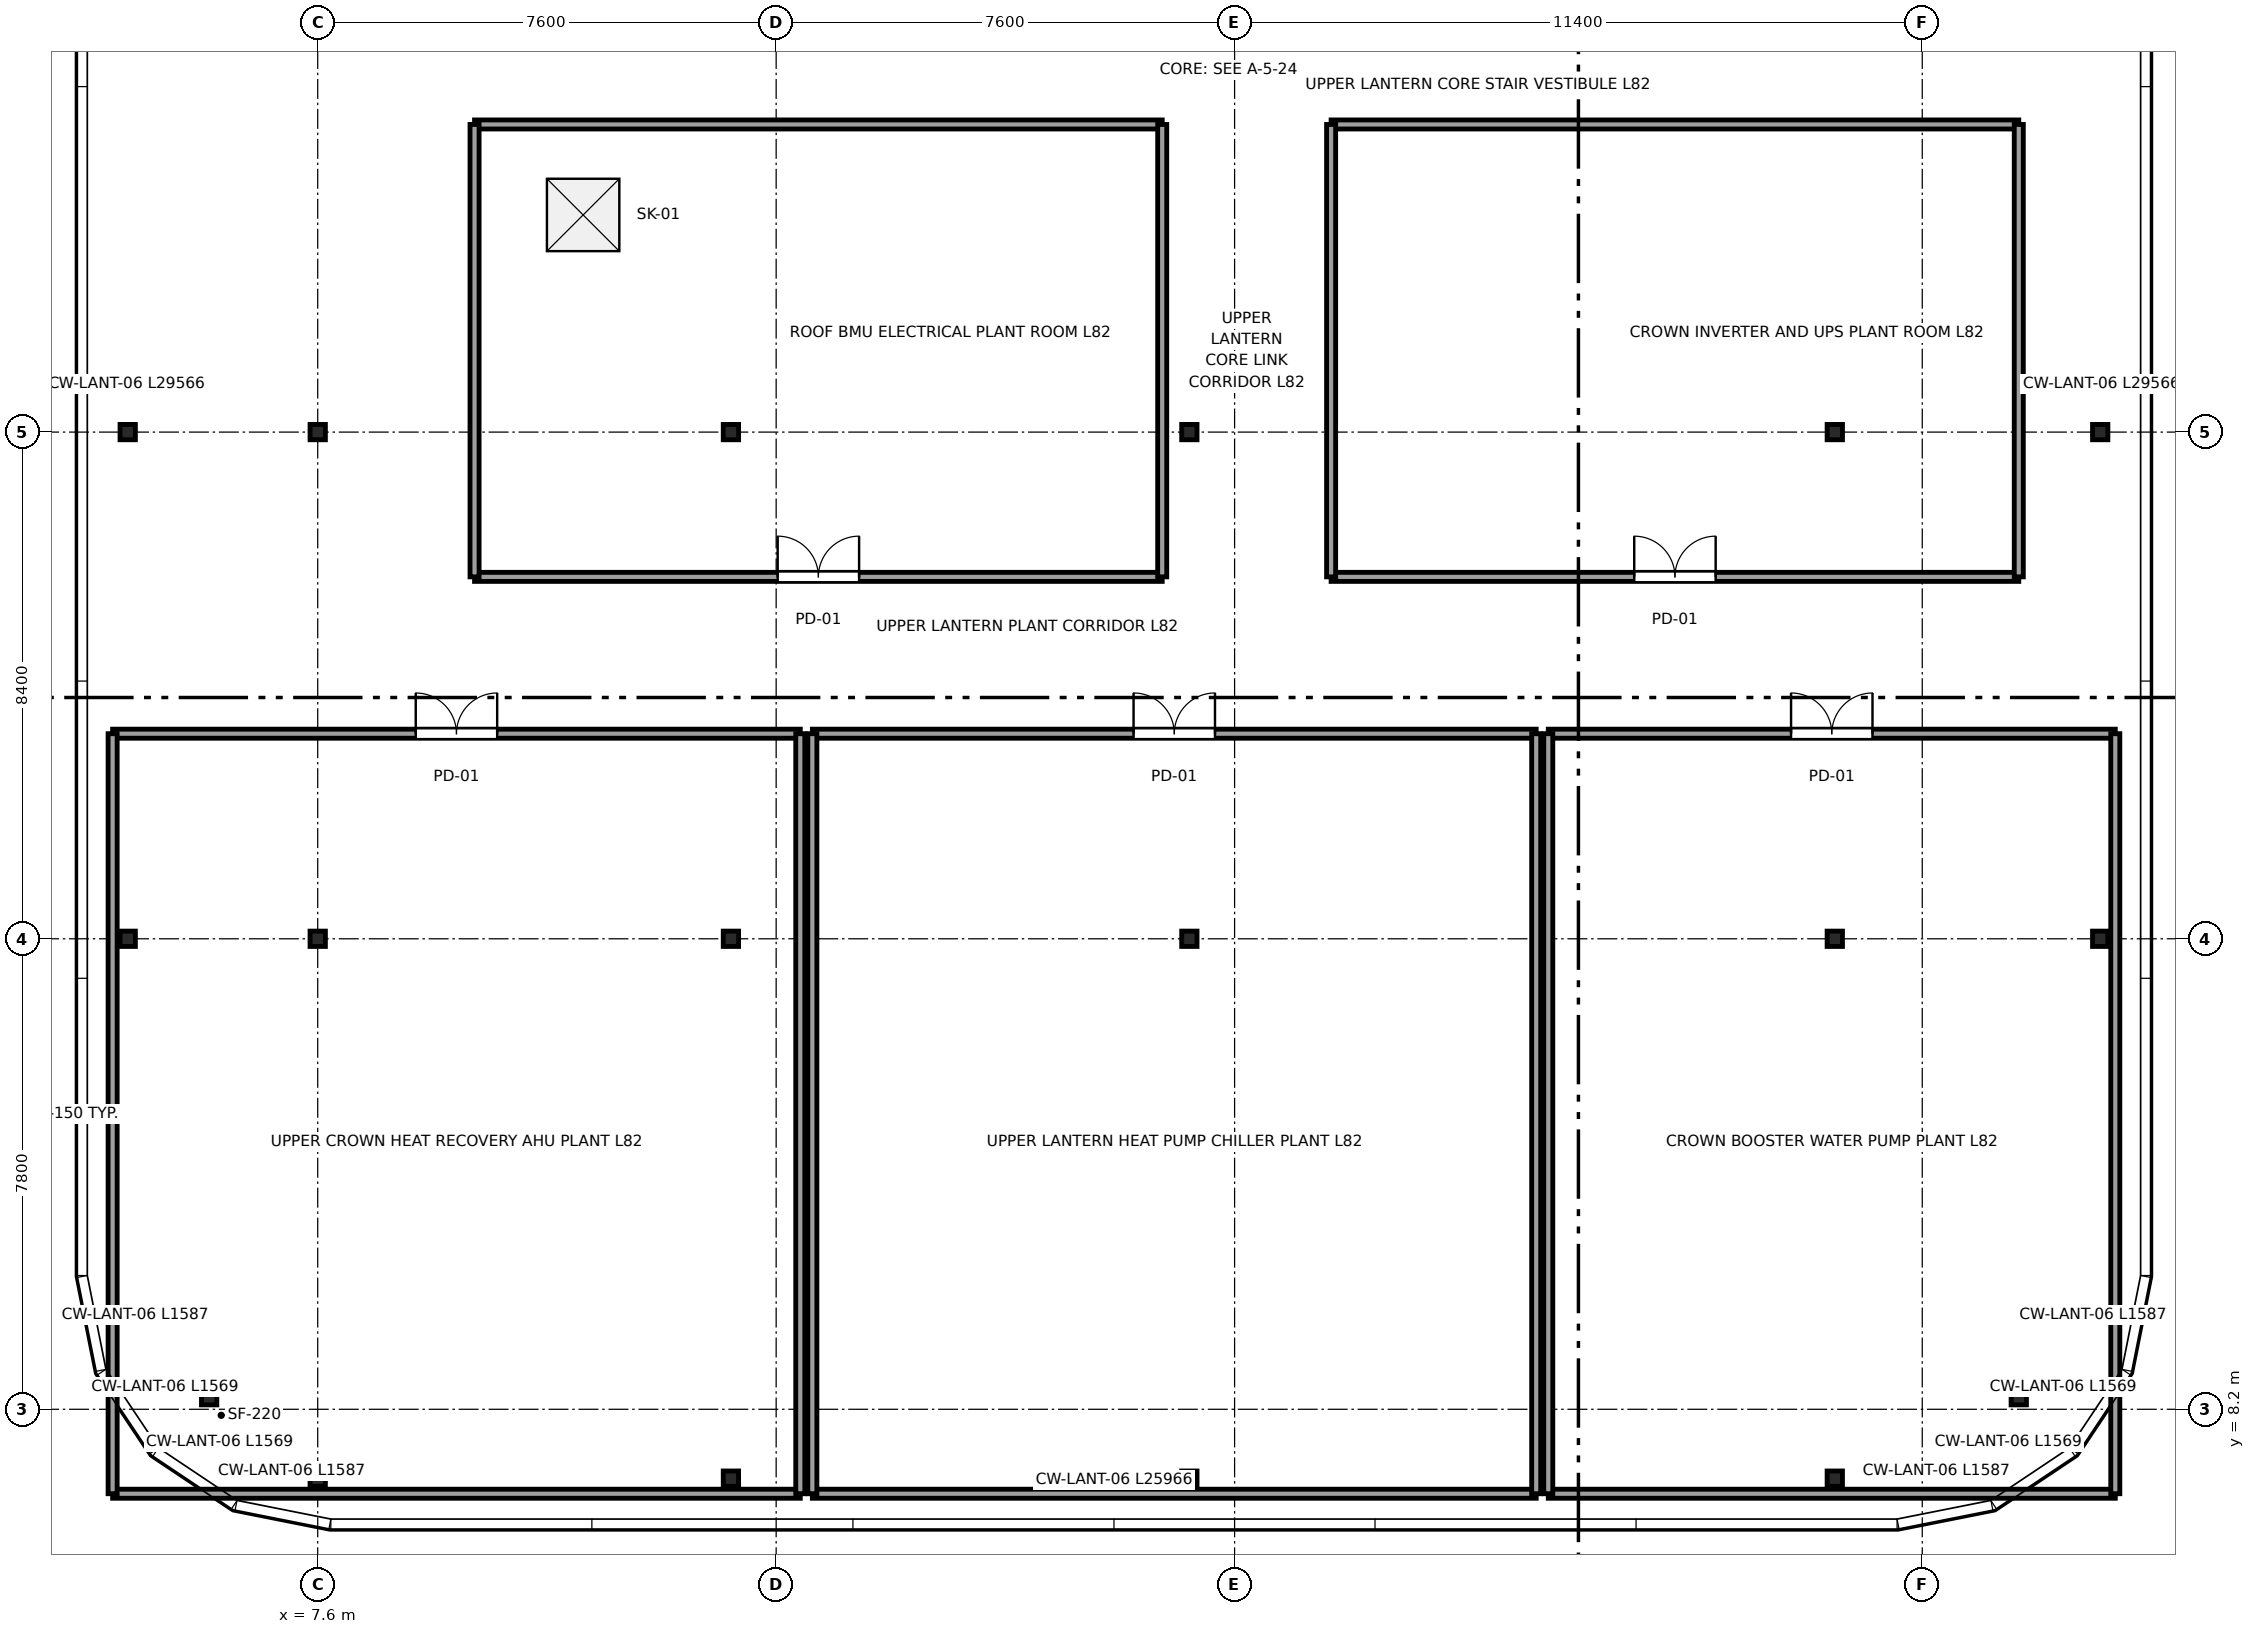
"""IFC4 building model, lengths in metres.
Left out: names, types, materials, properties, quantities, classifications, styles, units other than length and angle.
Written with IfcOpenShell. Run it as: python <this file> out.ifc"""

import sys

from ifc_helpers import new_model, si_unit, direction, frame, frame_2d, origin, origin_2d, place, context, subcontext, project, spatial, rectangle, i_section, extrude, source, transform, mapped, element, fill, save


model = new_model("IFC4")
c1 = context("Model", 3, precision=1e-05, world=origin(), true_north=direction((0.0, 1.0)))
c2 = subcontext(c1, "Body", "Model", "MODEL_VIEW")
j1 = project(units=[si_unit("LENGTHUNIT", "METRE"), si_unit("PLANEANGLEUNIT", "RADIAN")], contexts=[c1])
p1 = place(None, origin())
s1 = spatial("IfcSite", under=j1, at=p1, CompositionType="ELEMENT")
p2 = place(p1, origin())
s2 = spatial("IfcBuilding", under=s1, at=p2, CompositionType="ELEMENT")
p3 = place(p2, frame((0.0, 0.0, 309.95)))
s3 = spatial("IfcBuildingStorey", under=s2, at=p3, CompositionType="ELEMENT", Elevation=309.95)
m1 = source(origin(), c2, "Body", "SweptSolid", [
    extrude(i_section(OverallWidth=0.254, OverallDepth=0.254, WebThickness=0.009, FlangeThickness=0.014, FilletRadius=0.014, at=origin_2d()), origin(), (0.0, 0.0, 1.0), 3.8),
])
for number, where, z_axis, x_axis in (
    (1, (5.8, 8.4, 0.0), (0.0, 0.0, 1.0), (1.0, 0.0, 0.0)),
    (2, (4.45, 16.0, 0.0), (0.0, 0.0, 1.0), (1.0, 0.0, 0.0)),
    (3, (4.45, 24.4, 0.0), (0.0, 0.0, 1.0), (1.0, 0.0, 0.0)),
    (4, (7.6, 7.05, 0.0), (0.0, 0.0, 1.0), (1.0, 0.0, 0.0)),
    (5, (7.6, 16.0, 0.0), (0.0, 0.0, 1.0), (1.0, 0.0, 0.0)),
    (6, (7.6, 24.4, 0.0), (0.0, 0.0, 1.0), (1.0, 0.0, 0.0)),
    (7, (14.45, 7.05, 0.0), (0.0, 0.0, 1.0), (1.0, 0.0, 0.0)),
    (8, (14.45, 16.0, 0.0), (0.0, 0.0, 1.0), (1.0, 0.0, 0.0)),
    (9, (14.45, 24.4, 0.0), (0.0, 0.0, 1.0), (1.0, 0.0, 0.0)),
    (10, (22.05, 7.05, 0.0), (0.0, 0.0, 1.0), (1.0, 0.0, 0.0)),
    (11, (22.05, 16.0, 0.0), (0.0, 0.0, 1.0), (1.0, 0.0, 0.0)),
    (12, (22.05, 24.4, 0.0), (0.0, 0.0, 1.0), (1.0, 0.0, 0.0)),
    (13, (32.75, 7.05, 0.0), (0.0, 0.0, 1.0), (1.0, 0.0, 0.0)),
    (14, (32.75, 16.0, 0.0), (0.0, 0.0, 1.0), (1.0, 0.0, 0.0)),
    (15, (32.75, 24.4, 0.0), (0.0, 0.0, 1.0), (1.0, 0.0, 0.0)),
    (16, (35.8, 8.4, 0.0), (0.0, 0.0, 1.0), (1.0, 0.0, 0.0)),
    (17, (37.15, 16.0, 0.0), (0.0, 0.0, 1.0), (1.0, 0.0, 0.0)),
    (18, (37.15, 24.4, 0.0), (0.0, 0.0, 1.0), (1.0, 0.0, 0.0)),
):
    element("IfcColumn", number, at=place(p3, frame(where, z_axis=z_axis, x_axis=x_axis)), inside=s3, PredefinedType="COLUMN", context=c2, shape_type="MappedRepresentation", body=[
        mapped(m1, transform((0.0, 0.0, 0.0), x_axis=(1.0, 0.0, 0.0), y_axis=(0.0, 1.0, 0.0), z_axis=(0.0, 0.0, 1.0), scale=1.0)),
    ])
p4 = place(p3, frame((4.2, 6.8, 0.0), z_axis=(0.0, 0.0, 1.0), x_axis=(1.0, 0.0, 0.0)))
e19 = element("IfcWall", 19, at=p4, inside=s3, PredefinedType="PARTITIONING", context=c2, shape_type="SweptSolid", body=[
    extrude(rectangle(XDim=11.4, YDim=0.15, at=frame_2d((5.7, 0.0))), origin(), (0.0, 0.0, 1.0), 3.4),
])
p5 = place(p3, frame((4.2, 19.4, 0.0), z_axis=(0.0, 0.0, 1.0), x_axis=(1.0, 0.0, 0.0)))
e20 = element("IfcWall", 20, at=p5, inside=s3, PredefinedType="PARTITIONING", context=c2, shape_type="SweptSolid", body=[
    extrude(rectangle(XDim=11.4, YDim=0.15, at=frame_2d((5.7, 0.0))), origin(), (0.0, 0.0, 1.0), 3.4),
])
p6 = place(p5, frame((5.025, 0.0, 0.0)))
e21 = element("IfcOpeningElement", 21, at=p6, cuts=e20, PredefinedType="OPENING", context=c2, shape_type="SweptSolid", body=[
    extrude(rectangle(XDim=1.35, YDim=2.15, at=frame_2d((0.675, 1.075))), frame((0.0, 0.085, 0.0), z_axis=(0.0, -1.0, 0.0), x_axis=(1.0, 0.0, 0.0)), (0.0, 0.0, 1.0), 0.17),
])
for number, where, z_axis, x_axis in (
    (22, (4.2, 6.8, 0.0), (0.0, 0.0, 1.0), (0.0, 1.0, 0.0)),
    (23, (15.6, 6.8, 0.0), (0.0, 0.0, 1.0), (0.0, 1.0, 0.0)),
):
    element("IfcWall", number, at=place(p3, frame(where, z_axis=z_axis, x_axis=x_axis)), inside=s3, PredefinedType="PARTITIONING", context=c2, shape_type="SweptSolid", body=[
        extrude(rectangle(XDim=12.6, YDim=0.15, at=frame_2d((6.3, 0.0))), origin(), (0.0, 0.0, 1.0), 3.4),
    ])
p7 = place(p3, frame((15.8, 6.8, 0.0), z_axis=(0.0, 0.0, 1.0), x_axis=(1.0, 0.0, 0.0)))
e24 = element("IfcWall", 24, at=p7, inside=s3, PredefinedType="PARTITIONING", context=c2, shape_type="SweptSolid", body=[
    extrude(rectangle(XDim=12.0, YDim=0.15, at=frame_2d((6.0, 0.0))), origin(), (0.0, 0.0, 1.0), 3.4),
])
p8 = place(p3, frame((15.8, 19.4, 0.0), z_axis=(0.0, 0.0, 1.0), x_axis=(1.0, 0.0, 0.0)))
e25 = element("IfcWall", 25, at=p8, inside=s3, PredefinedType="PARTITIONING", context=c2, shape_type="SweptSolid", body=[
    extrude(rectangle(XDim=12.0, YDim=0.15, at=frame_2d((6.0, 0.0))), origin(), (0.0, 0.0, 1.0), 3.4),
])
p9 = place(p8, frame((5.325, 0.0, 0.0)))
e26 = element("IfcOpeningElement", 26, at=p9, cuts=e25, PredefinedType="OPENING", context=c2, shape_type="SweptSolid", body=[
    extrude(rectangle(XDim=1.35, YDim=2.15, at=frame_2d((0.675, 1.075))), frame((0.0, 0.085, 0.0), z_axis=(0.0, -1.0, 0.0), x_axis=(1.0, 0.0, 0.0)), (0.0, 0.0, 1.0), 0.17),
])
for number, where, z_axis, x_axis in (
    (27, (15.8, 6.8, 0.0), (0.0, 0.0, 1.0), (0.0, 1.0, 0.0)),
    (28, (27.8, 6.8, 0.0), (0.0, 0.0, 1.0), (0.0, 1.0, 0.0)),
):
    element("IfcWall", number, at=place(p3, frame(where, z_axis=z_axis, x_axis=x_axis)), inside=s3, PredefinedType="PARTITIONING", context=c2, shape_type="SweptSolid", body=[
        extrude(rectangle(XDim=12.6, YDim=0.15, at=frame_2d((6.3, 0.0))), origin(), (0.0, 0.0, 1.0), 3.4),
    ])
p10 = place(p3, frame((28.0, 6.8, 0.0), z_axis=(0.0, 0.0, 1.0), x_axis=(1.0, 0.0, 0.0)))
e29 = element("IfcWall", 29, at=p10, inside=s3, PredefinedType="PARTITIONING", context=c2, shape_type="SweptSolid", body=[
    extrude(rectangle(XDim=9.4, YDim=0.15, at=frame_2d((4.7, 0.0))), origin(), (0.0, 0.0, 1.0), 3.4),
])
p11 = place(p3, frame((28.0, 19.4, 0.0), z_axis=(0.0, 0.0, 1.0), x_axis=(1.0, 0.0, 0.0)))
e30 = element("IfcWall", 30, at=p11, inside=s3, PredefinedType="PARTITIONING", context=c2, shape_type="SweptSolid", body=[
    extrude(rectangle(XDim=9.4, YDim=0.15, at=frame_2d((4.7, 0.0))), origin(), (0.0, 0.0, 1.0), 3.4),
])
p12 = place(p11, frame((4.025, 0.0, 0.0)))
e31 = element("IfcOpeningElement", 31, at=p12, cuts=e30, PredefinedType="OPENING", context=c2, shape_type="SweptSolid", body=[
    extrude(rectangle(XDim=1.35, YDim=2.15, at=frame_2d((0.675, 1.075))), frame((0.0, 0.085, 0.0), z_axis=(0.0, -1.0, 0.0), x_axis=(1.0, 0.0, 0.0)), (0.0, 0.0, 1.0), 0.17),
])
for number, where, z_axis, x_axis in (
    (32, (28.0, 6.8, 0.0), (0.0, 0.0, 1.0), (0.0, 1.0, 0.0)),
    (33, (37.4, 6.8, 0.0), (0.0, 0.0, 1.0), (0.0, 1.0, 0.0)),
):
    element("IfcWall", number, at=place(p3, frame(where, z_axis=z_axis, x_axis=x_axis)), inside=s3, PredefinedType="PARTITIONING", context=c2, shape_type="SweptSolid", body=[
        extrude(rectangle(XDim=12.6, YDim=0.15, at=frame_2d((6.3, 0.0))), origin(), (0.0, 0.0, 1.0), 3.4),
    ])
p13 = place(p3, frame((10.2, 22.0, 0.0), z_axis=(0.0, 0.0, 1.0), x_axis=(1.0, 0.0, 0.0)))
e34 = element("IfcWall", 34, at=p13, inside=s3, PredefinedType="PARTITIONING", context=c2, shape_type="SweptSolid", body=[
    extrude(rectangle(XDim=11.4, YDim=0.15, at=frame_2d((5.7, 0.0))), origin(), (0.0, 0.0, 1.0), 3.4),
])
p14 = place(p13, frame((5.025, 0.0, 0.0)))
e35 = element("IfcOpeningElement", 35, at=p14, cuts=e34, PredefinedType="OPENING", context=c2, shape_type="SweptSolid", body=[
    extrude(rectangle(XDim=1.35, YDim=2.15, at=frame_2d((0.675, 1.075))), frame((0.0, 0.085, 0.0), z_axis=(0.0, -1.0, 0.0), x_axis=(1.0, 0.0, 0.0)), (0.0, 0.0, 1.0), 0.17),
])
p15 = place(p3, frame((10.2, 29.5, 0.0), z_axis=(0.0, 0.0, 1.0), x_axis=(1.0, 0.0, 0.0)))
e36 = element("IfcWall", 36, at=p15, inside=s3, PredefinedType="PARTITIONING", context=c2, shape_type="SweptSolid", body=[
    extrude(rectangle(XDim=11.4, YDim=0.15, at=frame_2d((5.7, 0.0))), origin(), (0.0, 0.0, 1.0), 3.4),
])
for number, where, z_axis, x_axis in (
    (37, (10.2, 22.0, 0.0), (0.0, 0.0, 1.0), (0.0, 1.0, 0.0)),
    (38, (21.6, 22.0, 0.0), (0.0, 0.0, 1.0), (0.0, 1.0, 0.0)),
):
    element("IfcWall", number, at=place(p3, frame(where, z_axis=z_axis, x_axis=x_axis)), inside=s3, PredefinedType="PARTITIONING", context=c2, shape_type="SweptSolid", body=[
        extrude(rectangle(XDim=7.5, YDim=0.15, at=frame_2d((3.75, 0.0))), origin(), (0.0, 0.0, 1.0), 3.4),
    ])
p16 = place(p3, frame((24.4, 22.0, 0.0), z_axis=(0.0, 0.0, 1.0), x_axis=(1.0, 0.0, 0.0)))
e39 = element("IfcWall", 39, at=p16, inside=s3, PredefinedType="PARTITIONING", context=c2, shape_type="SweptSolid", body=[
    extrude(rectangle(XDim=11.4, YDim=0.15, at=frame_2d((5.7, 0.0))), origin(), (0.0, 0.0, 1.0), 3.4),
])
p17 = place(p16, frame((5.025, 0.0, 0.0)))
e40 = element("IfcOpeningElement", 40, at=p17, cuts=e39, PredefinedType="OPENING", context=c2, shape_type="SweptSolid", body=[
    extrude(rectangle(XDim=1.35, YDim=2.15, at=frame_2d((0.675, 1.075))), frame((0.0, 0.085, 0.0), z_axis=(0.0, -1.0, 0.0), x_axis=(1.0, 0.0, 0.0)), (0.0, 0.0, 1.0), 0.17),
])
p18 = place(p3, frame((24.4, 29.5, 0.0), z_axis=(0.0, 0.0, 1.0), x_axis=(1.0, 0.0, 0.0)))
e41 = element("IfcWall", 41, at=p18, inside=s3, PredefinedType="PARTITIONING", context=c2, shape_type="SweptSolid", body=[
    extrude(rectangle(XDim=11.4, YDim=0.15, at=frame_2d((5.7, 0.0))), origin(), (0.0, 0.0, 1.0), 3.4),
])
for number, where, z_axis, x_axis in (
    (42, (24.4, 22.0, 0.0), (0.0, 0.0, 1.0), (0.0, 1.0, 0.0)),
    (43, (35.8, 22.0, 0.0), (0.0, 0.0, 1.0), (0.0, 1.0, 0.0)),
):
    element("IfcWall", number, at=place(p3, frame(where, z_axis=z_axis, x_axis=x_axis)), inside=s3, PredefinedType="PARTITIONING", context=c2, shape_type="SweptSolid", body=[
        extrude(rectangle(XDim=7.5, YDim=0.15, at=frame_2d((3.75, 0.0))), origin(), (0.0, 0.0, 1.0), 3.4),
    ])
p19 = place(p2, frame((0.0, 0.0, 313.75)))
p20 = place(p19, frame((0.0, 0.0, -0.4)))
p21 = place(p20, frame((12.0, 28.0, 0.0)))
p22 = place(p21, frame((0.0, 0.0, 0.34)))
e44 = element("IfcWindow", 44, at=p22, inside=s3, PartitioningType="SINGLE_PANEL", PredefinedType="SKYLIGHT", context=c2, shape_type="SweptSolid", body=[
    extrude(rectangle(XDim=1.2, YDim=1.2, at=origin_2d()), origin(), (0.0, 0.0, 1.0), 0.06),
])
m2 = source(origin(), c2, "Body", "SweptSolid", [
    extrude(rectangle(XDim=1.35, YDim=2.15, at=frame_2d((0.675, 1.075))), frame((0.0, 0.025, 0.0), z_axis=(0.0, -1.0, 0.0), x_axis=(1.0, 0.0, 0.0)), (0.0, 0.0, 1.0), 0.05),
])
p23 = place(p6, origin())
e45 = element("IfcDoor", 45, at=p23, inside=s3, OperationType="DOUBLE_DOOR_SINGLE_SWING", PredefinedType="DOOR", context=c2, shape_type="MappedRepresentation", body=[
    mapped(m2, transform((0.0, 0.0, 0.0), x_axis=(1.0, 0.0, 0.0), y_axis=(0.0, 1.0, 0.0), z_axis=(0.0, 0.0, 1.0), scale=1.0)),
])
fill(e21, e45)
p24 = place(p9, origin())
e46 = element("IfcDoor", 46, at=p24, inside=s3, OperationType="DOUBLE_DOOR_SINGLE_SWING", PredefinedType="DOOR", context=c2, shape_type="MappedRepresentation", body=[
    mapped(m2, transform((0.0, 0.0, 0.0), x_axis=(1.0, 0.0, 0.0), y_axis=(0.0, 1.0, 0.0), z_axis=(0.0, 0.0, 1.0), scale=1.0)),
])
fill(e26, e46)
p25 = place(p12, origin())
e47 = element("IfcDoor", 47, at=p25, inside=s3, OperationType="DOUBLE_DOOR_SINGLE_SWING", PredefinedType="DOOR", context=c2, shape_type="MappedRepresentation", body=[
    mapped(m2, transform((0.0, 0.0, 0.0), x_axis=(1.0, 0.0, 0.0), y_axis=(0.0, 1.0, 0.0), z_axis=(0.0, 0.0, 1.0), scale=1.0)),
])
fill(e31, e47)
p26 = place(p14, origin())
e48 = element("IfcDoor", 48, at=p26, inside=s3, OperationType="DOUBLE_DOOR_SINGLE_SWING", PredefinedType="DOOR", context=c2, shape_type="MappedRepresentation", body=[
    mapped(m2, transform((0.0, 0.0, 0.0), x_axis=(1.0, 0.0, 0.0), y_axis=(0.0, 1.0, 0.0), z_axis=(0.0, 0.0, 1.0), scale=1.0)),
])
fill(e35, e48)
p27 = place(p17, origin())
e49 = element("IfcDoor", 49, at=p27, inside=s3, OperationType="DOUBLE_DOOR_SINGLE_SWING", PredefinedType="DOOR", context=c2, shape_type="MappedRepresentation", body=[
    mapped(m2, transform((0.0, 0.0, 0.0), x_axis=(1.0, 0.0, 0.0), y_axis=(0.0, 1.0, 0.0), z_axis=(0.0, 0.0, 1.0), scale=1.0)),
])
fill(e40, e49)
save(model, sys.argv[1])
